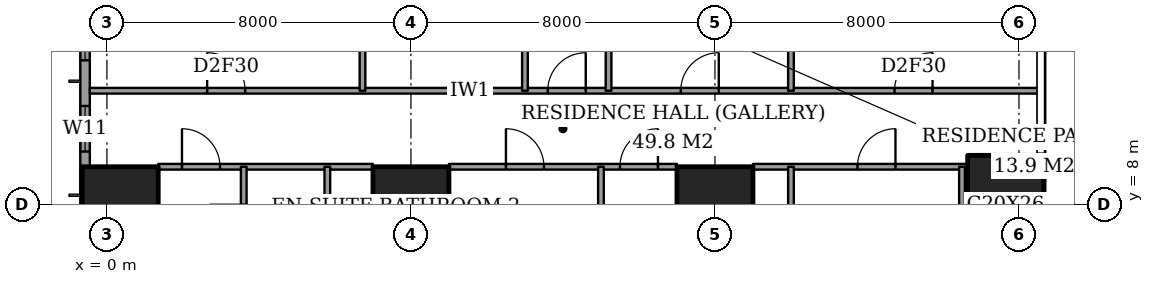
"""IFC4 building model, lengths in metres.
Left out: names, types, materials, properties, quantities, classifications, styles, units other than length and angle.
Written with IfcOpenShell. Run it as: python <this file> out.ifc"""

import sys

from ifc_helpers import new_model, si_unit, direction, frame, frame_2d, origin, origin_2d, place, context, subcontext, project, spatial, rectangle, extrude, element, fill, save


model = new_model("IFC4")
c1 = context("Model", 3, precision=1e-05, world=origin(), true_north=direction((0.0, 1.0)))
c2 = subcontext(c1, "Body", "Model", "MODEL_VIEW")
j1 = project(units=[si_unit("LENGTHUNIT", "METRE"), si_unit("PLANEANGLEUNIT", "RADIAN")], contexts=[c1])
p1 = place(None, origin())
s1 = spatial("IfcSite", under=j1, at=p1, CompositionType="ELEMENT")
p2 = place(p1, origin())
s2 = spatial("IfcBuilding", under=s1, at=p2, CompositionType="ELEMENT")
p3 = place(p2, frame((0.0, 0.0, 143.0)))
s3 = spatial("IfcBuildingStorey", under=s2, at=p3, CompositionType="ELEMENT", Elevation=143.0)
for number, where, z_axis, x_axis in (
    (1, (0.35, 8.0, 0.0), (0.0, 0.0, 1.0), (1.0, 0.0, 0.0)),
    (2, (8.0, 8.0, 0.0), (0.0, 0.0, 1.0), (1.0, 0.0, 0.0)),
    (3, (16.0, 8.0, 0.0), (0.0, 0.0, 1.0), (1.0, 0.0, 0.0)),
):
    element("IfcColumn", number, at=place(p3, frame(where, z_axis=z_axis, x_axis=x_axis)), inside=s3, PredefinedType="COLUMN", context=c2, shape_type="SweptSolid", body=[
        extrude(rectangle(XDim=2.0, YDim=2.0, at=origin_2d()), origin(), (0.0, 0.0, 1.0), 3.6),
    ])
p4 = place(p3, frame((23.65, 8.0, 0.0), z_axis=(0.0, 0.0, 1.0), x_axis=(1.0, 0.0, 0.0)))
e4 = element("IfcColumn", 4, at=p4, inside=s3, PredefinedType="COLUMN", context=c2, shape_type="SweptSolid", body=[
    extrude(rectangle(XDim=2.0, YDim=2.6, at=origin_2d()), origin(), (0.0, 0.0, 1.0), 3.6),
])
p5 = place(p3, frame((-0.575, 44.825, 0.0), z_axis=(0.0, 0.0, 1.0), x_axis=(0.0, -1.0, 0.0)))
e5 = element("IfcWall", 5, at=p5, inside=s3, PredefinedType="SOLIDWALL", context=c2, shape_type="SweptSolid", body=[
    extrude(rectangle(XDim=41.65, YDim=0.25, at=frame_2d((20.825, 0.0))), origin(), (0.0, 0.0, 1.0), 3.6),
])
p6 = place(p5, frame((0.775, 0.0, 0.4)))
e6 = element("IfcOpeningElement", 6, at=p6, cuts=e5, PredefinedType="OPENING", context=c2, shape_type="SweptSolid", body=[
    extrude(rectangle(XDim=2.4, YDim=2.2, at=frame_2d((1.2, 1.1))), frame((0.0, 0.135, 0.0), z_axis=(0.0, -1.0, 0.0), x_axis=(1.0, 0.0, 0.0)), (0.0, 0.0, 1.0), 0.27),
])
p7 = place(p5, frame((6.1, 0.0, 0.4)))
e7 = element("IfcOpeningElement", 7, at=p7, cuts=e5, PredefinedType="OPENING", context=c2, shape_type="SweptSolid", body=[
    extrude(rectangle(XDim=1.2, YDim=2.2, at=frame_2d((0.6, 1.1))), frame((0.0, 0.135, 0.0), z_axis=(0.0, -1.0, 0.0), x_axis=(1.0, 0.0, 0.0)), (0.0, 0.0, 1.0), 0.27),
])
p8 = place(p5, frame((8.425, 0.0, 0.4)))
e8 = element("IfcOpeningElement", 8, at=p8, cuts=e5, PredefinedType="OPENING", context=c2, shape_type="SweptSolid", body=[
    extrude(rectangle(XDim=2.4, YDim=2.2, at=frame_2d((1.2, 1.1))), frame((0.0, 0.135, 0.0), z_axis=(0.0, -1.0, 0.0), x_axis=(1.0, 0.0, 0.0)), (0.0, 0.0, 1.0), 0.27),
])
p9 = place(p5, frame((15.625, 0.0, 0.4)))
e9 = element("IfcOpeningElement", 9, at=p9, cuts=e5, PredefinedType="OPENING", context=c2, shape_type="SweptSolid", body=[
    extrude(rectangle(XDim=2.4, YDim=2.2, at=frame_2d((1.2, 1.1))), frame((0.0, 0.135, 0.0), z_axis=(0.0, -1.0, 0.0), x_axis=(1.0, 0.0, 0.0)), (0.0, 0.0, 1.0), 0.27),
])
p10 = place(p5, frame((23.625, 0.0, 0.4)))
e10 = element("IfcOpeningElement", 10, at=p10, cuts=e5, PredefinedType="OPENING", context=c2, shape_type="SweptSolid", body=[
    extrude(rectangle(XDim=2.4, YDim=2.2, at=frame_2d((1.2, 1.1))), frame((0.0, 0.135, 0.0), z_axis=(0.0, -1.0, 0.0), x_axis=(1.0, 0.0, 0.0)), (0.0, 0.0, 1.0), 0.27),
])
p11 = place(p5, frame((30.625, 0.0, 0.4)))
e11 = element("IfcOpeningElement", 11, at=p11, cuts=e5, PredefinedType="OPENING", context=c2, shape_type="SweptSolid", body=[
    extrude(rectangle(XDim=2.4, YDim=2.2, at=frame_2d((1.2, 1.1))), frame((0.0, 0.135, 0.0), z_axis=(0.0, -1.0, 0.0), x_axis=(1.0, 0.0, 0.0)), (0.0, 0.0, 1.0), 0.27),
])
p12 = place(p5, frame((34.225, 0.0, 0.4)))
e12 = element("IfcOpeningElement", 12, at=p12, cuts=e5, PredefinedType="OPENING", context=c2, shape_type="SweptSolid", body=[
    extrude(rectangle(XDim=1.2, YDim=2.2, at=frame_2d((0.6, 1.1))), frame((0.0, 0.135, 0.0), z_axis=(0.0, -1.0, 0.0), x_axis=(1.0, 0.0, 0.0)), (0.0, 0.0, 1.0), 0.27),
])
p13 = place(p5, frame((38.475, 0.0, 0.4)))
e13 = element("IfcOpeningElement", 13, at=p13, cuts=e5, PredefinedType="OPENING", context=c2, shape_type="SweptSolid", body=[
    extrude(rectangle(XDim=2.4, YDim=2.2, at=frame_2d((1.2, 1.1))), frame((0.0, 0.135, 0.0), z_axis=(0.0, -1.0, 0.0), x_axis=(1.0, 0.0, 0.0)), (0.0, 0.0, 1.0), 0.27),
])
p14 = place(p3, frame((1.35, 9.0, 0.0), z_axis=(0.0, 0.0, 1.0), x_axis=(1.0, 0.0, 0.0)))
e14 = element("IfcWall", 14, at=p14, inside=s3, PredefinedType="PARTITIONING", context=c2, shape_type="SweptSolid", body=[
    extrude(rectangle(XDim=5.65, YDim=0.15, at=frame_2d((2.825, 0.0))), origin(), (0.0, 0.0, 1.0), 3.35),
])
p15 = place(p14, frame((0.625, 0.0, 0.0)))
e15 = element("IfcOpeningElement", 15, at=p15, cuts=e14, PredefinedType="OPENING", context=c2, shape_type="SweptSolid", body=[
    extrude(rectangle(XDim=1.0, YDim=2.1, at=frame_2d((0.5, 1.05))), frame((0.0, 0.085, 0.0), z_axis=(0.0, -1.0, 0.0), x_axis=(1.0, 0.0, 0.0)), (0.0, 0.0, 1.0), 0.17),
])
p16 = place(p3, frame((9.0, 9.0, 0.0), z_axis=(0.0, 0.0, 1.0), x_axis=(1.0, 0.0, 0.0)))
e16 = element("IfcWall", 16, at=p16, inside=s3, PredefinedType="PARTITIONING", context=c2, shape_type="SweptSolid", body=[
    extrude(rectangle(XDim=6.0, YDim=0.15, at=frame_2d((3.0, 0.0))), origin(), (0.0, 0.0, 1.0), 3.35),
])
p17 = place(p16, frame((1.5, 0.0, 0.0)))
e17 = element("IfcOpeningElement", 17, at=p17, cuts=e16, PredefinedType="OPENING", context=c2, shape_type="SweptSolid", body=[
    extrude(rectangle(XDim=1.0, YDim=2.1, at=frame_2d((0.5, 1.05))), frame((0.0, 0.085, 0.0), z_axis=(0.0, -1.0, 0.0), x_axis=(1.0, 0.0, 0.0)), (0.0, 0.0, 1.0), 0.17),
])
p18 = place(p16, frame((4.5, 0.0, 0.0)))
e18 = element("IfcOpeningElement", 18, at=p18, cuts=e16, PredefinedType="OPENING", context=c2, shape_type="SweptSolid", body=[
    extrude(rectangle(XDim=1.0, YDim=2.1, at=frame_2d((0.5, 1.05))), frame((0.0, 0.085, 0.0), z_axis=(0.0, -1.0, 0.0), x_axis=(1.0, 0.0, 0.0)), (0.0, 0.0, 1.0), 0.17),
])
p19 = place(p3, frame((17.0, 9.0, 0.0), z_axis=(0.0, 0.0, 1.0), x_axis=(1.0, 0.0, 0.0)))
e19 = element("IfcWall", 19, at=p19, inside=s3, PredefinedType="PARTITIONING", context=c2, shape_type="SweptSolid", body=[
    extrude(rectangle(XDim=5.65, YDim=0.15, at=frame_2d((2.825, 0.0))), origin(), (0.0, 0.0, 1.0), 3.35),
])
p20 = place(p19, frame((2.75, 0.0, 0.0)))
e20 = element("IfcOpeningElement", 20, at=p20, cuts=e19, PredefinedType="OPENING", context=c2, shape_type="SweptSolid", body=[
    extrude(rectangle(XDim=1.0, YDim=2.1, at=frame_2d((0.5, 1.05))), frame((0.0, 0.085, 0.0), z_axis=(0.0, -1.0, 0.0), x_axis=(1.0, 0.0, 0.0)), (0.0, 0.0, 1.0), 0.17),
])
p21 = place(p3, frame((-0.45, 11.0, 0.0), z_axis=(0.0, 0.0, 1.0), x_axis=(1.0, 0.0, 0.0)))
e21 = element("IfcWall", 21, at=p21, inside=s3, PredefinedType="PARTITIONING", context=c2, shape_type="SweptSolid", body=[
    extrude(rectangle(XDim=25.011, YDim=0.15, at=frame_2d((12.505, 0.0))), origin(), (0.0, 0.0, 1.0), 3.35),
])
p22 = place(p21, frame((12.05, 0.0, 0.0)))
e22 = element("IfcOpeningElement", 22, at=p22, cuts=e21, PredefinedType="OPENING", context=c2, shape_type="SweptSolid", body=[
    extrude(rectangle(XDim=1.0, YDim=2.1, at=frame_2d((0.5, 1.05))), frame((0.0, 0.085, 0.0), z_axis=(0.0, -1.0, 0.0), x_axis=(1.0, 0.0, 0.0)), (0.0, 0.0, 1.0), 0.17),
])
p23 = place(p21, frame((3.087, 0.0, 0.0)))
e23 = element("IfcOpeningElement", 23, at=p23, cuts=e21, PredefinedType="OPENING", context=c2, shape_type="SweptSolid", body=[
    extrude(rectangle(XDim=1.0, YDim=2.1, at=frame_2d((0.5, 1.05))), frame((0.0, 0.085, 0.0), z_axis=(0.0, -1.0, 0.0), x_axis=(1.0, 0.0, 0.0)), (0.0, 0.0, 1.0), 0.17),
])
p24 = place(p21, frame((15.55, 0.0, 0.0)))
e24 = element("IfcOpeningElement", 24, at=p24, cuts=e21, PredefinedType="OPENING", context=c2, shape_type="SweptSolid", body=[
    extrude(rectangle(XDim=1.0, YDim=2.1, at=frame_2d((0.5, 1.05))), frame((0.0, 0.085, 0.0), z_axis=(0.0, -1.0, 0.0), x_axis=(1.0, 0.0, 0.0)), (0.0, 0.0, 1.0), 0.17),
])
p25 = place(p21, frame((21.175, 0.0, 0.0)))
e25 = element("IfcOpeningElement", 25, at=p25, cuts=e21, PredefinedType="OPENING", context=c2, shape_type="SweptSolid", body=[
    extrude(rectangle(XDim=1.0, YDim=2.1, at=frame_2d((0.5, 1.05))), frame((0.0, 0.085, 0.0), z_axis=(0.0, -1.0, 0.0), x_axis=(1.0, 0.0, 0.0)), (0.0, 0.0, 1.0), 0.17),
])
p26 = place(p3, frame((3.6, 6.1, 0.0), z_axis=(0.0, 0.0, 1.0), x_axis=(0.0, 1.0, 0.0)))
e26 = element("IfcWall", 26, at=p26, inside=s3, PredefinedType="PARTITIONING", context=c2, shape_type="SweptSolid", body=[
    extrude(rectangle(XDim=2.9, YDim=0.15, at=frame_2d((1.45, 0.0))), origin(), (0.0, 0.0, 1.0), 3.35),
])
p27 = place(p26, frame((1.0, 0.0, 0.0)))
e27 = element("IfcOpeningElement", 27, at=p27, cuts=e26, PredefinedType="OPENING", context=c2, shape_type="SweptSolid", body=[
    extrude(rectangle(XDim=0.9, YDim=2.1, at=frame_2d((0.45, 1.05))), frame((0.0, 0.085, 0.0), z_axis=(0.0, -1.0, 0.0), x_axis=(1.0, 0.0, 0.0)), (0.0, 0.0, 1.0), 0.17),
])
p28 = place(p3, frame((5.8, -0.45, 0.0), z_axis=(0.0, 0.0, 1.0), x_axis=(0.0, 1.0, 0.0)))
e28 = element("IfcWall", 28, at=p28, inside=s3, PredefinedType="PARTITIONING", context=c2, shape_type="SweptSolid", body=[
    extrude(rectangle(XDim=9.45, YDim=0.15, at=frame_2d((4.725, 0.0))), origin(), (0.0, 0.0, 1.0), 3.35),
])
p29 = place(p3, frame((6.725, 11.0, 0.0), z_axis=(0.0, 0.0, 1.0), x_axis=(0.0, 1.0, 0.0)))
e29 = element("IfcWall", 29, at=p29, inside=s3, PredefinedType="PARTITIONING", context=c2, shape_type="SweptSolid", body=[
    extrude(rectangle(XDim=3.8, YDim=0.15, at=frame_2d((1.9, 0.0))), origin(), (0.0, 0.0, 1.0), 3.35),
])
p30 = place(p29, frame((1.15, 0.0, 0.0)))
e30 = element("IfcOpeningElement", 30, at=p30, cuts=e29, PredefinedType="OPENING", context=c2, shape_type="SweptSolid", body=[
    extrude(rectangle(XDim=0.9, YDim=2.1, at=frame_2d((0.45, 1.05))), frame((0.0, 0.085, 0.0), z_axis=(0.0, -1.0, 0.0), x_axis=(1.0, 0.0, 0.0)), (0.0, 0.0, 1.0), 0.17),
])
p31 = place(p3, frame((11.0, 11.0, 0.0), z_axis=(0.0, 0.0, 1.0), x_axis=(0.0, 1.0, 0.0)))
e31 = element("IfcWall", 31, at=p31, inside=s3, PredefinedType="PARTITIONING", context=c2, shape_type="SweptSolid", body=[
    extrude(rectangle(XDim=10.6, YDim=0.15, at=frame_2d((5.3, 0.0))), origin(), (0.0, 0.0, 1.0), 3.35),
])
p32 = place(p31, frame((7.962, 0.0, 0.0)))
e32 = element("IfcOpeningElement", 32, at=p32, cuts=e31, PredefinedType="OPENING", context=c2, shape_type="SweptSolid", body=[
    extrude(rectangle(XDim=1.0, YDim=2.1, at=frame_2d((0.5, 1.05))), frame((0.0, 0.085, 0.0), z_axis=(0.0, -1.0, 0.0), x_axis=(1.0, 0.0, 0.0)), (0.0, 0.0, 1.0), 0.17),
])
p33 = place(p3, frame((13.0, -0.45, 0.0), z_axis=(0.0, 0.0, 1.0), x_axis=(0.0, 1.0, 0.0)))
e33 = element("IfcWall", 33, at=p33, inside=s3, PredefinedType="PARTITIONING", context=c2, shape_type="SweptSolid", body=[
    extrude(rectangle(XDim=9.45, YDim=0.15, at=frame_2d((4.725, 0.0))), origin(), (0.0, 0.0, 1.0), 3.35),
])
p34 = place(p3, frame((13.2, 11.0, 0.0), z_axis=(0.0, 0.0, 1.0), x_axis=(0.0, 1.0, 0.0)))
e34 = element("IfcWall", 34, at=p34, inside=s3, PredefinedType="PARTITIONING", context=c2, shape_type="SweptSolid", body=[
    extrude(rectangle(XDim=6.325, YDim=0.15, at=frame_2d((3.163, 0.0))), origin(), (0.0, 0.0, 1.0), 3.35),
])
p35 = place(p3, frame((18.0, -0.45, 0.0), z_axis=(0.0, 0.0, 1.0), x_axis=(0.0, 1.0, 0.0)))
e35 = element("IfcWall", 35, at=p35, inside=s3, PredefinedType="PARTITIONING", context=c2, shape_type="SweptSolid", body=[
    extrude(rectangle(XDim=9.45, YDim=0.15, at=frame_2d((4.725, 0.0))), origin(), (0.0, 0.0, 1.0), 3.35),
])
p36 = place(p3, frame((18.0, 11.0, 0.0), z_axis=(0.0, 0.0, 1.0), x_axis=(0.0, 1.0, 0.0)))
e36 = element("IfcWall", 36, at=p36, inside=s3, PredefinedType="PARTITIONING", context=c2, shape_type="SweptSolid", body=[
    extrude(rectangle(XDim=6.325, YDim=0.15, at=frame_2d((3.163, 0.0))), origin(), (0.0, 0.0, 1.0), 3.35),
])
p37 = place(p3, frame((22.5, -0.45, 0.0), z_axis=(0.0, 0.0, 1.0), x_axis=(0.0, 1.0, 0.0)))
e37 = element("IfcWall", 37, at=p37, inside=s3, PredefinedType="PARTITIONING", context=c2, shape_type="SweptSolid", body=[
    extrude(rectangle(XDim=9.45, YDim=0.15, at=frame_2d((4.725, 0.0))), origin(), (0.0, 0.0, 1.0), 3.35),
])
p38 = place(p37, frame((4.275, 0.0, 0.0)))
e38 = element("IfcOpeningElement", 38, at=p38, cuts=e37, PredefinedType="OPENING", context=c2, shape_type="SweptSolid", body=[
    extrude(rectangle(XDim=0.9, YDim=2.1, at=frame_2d((0.45, 1.05))), frame((0.0, 0.085, 0.0), z_axis=(0.0, -1.0, 0.0), x_axis=(1.0, 0.0, 0.0)), (0.0, 0.0, 1.0), 0.17),
])
p39 = place(p11, origin())
e39 = element("IfcWindow", 39, at=p39, inside=s3, PartitioningType="SINGLE_PANEL", PredefinedType="WINDOW", context=c2, shape_type="SweptSolid", body=[
    extrude(rectangle(XDim=2.4, YDim=2.2, at=frame_2d((1.2, 1.1))), frame((0.0, 0.03, 0.0), z_axis=(0.0, -1.0, 0.0), x_axis=(1.0, 0.0, 0.0)), (0.0, 0.0, 1.0), 0.06),
])
fill(e11, e39)
p40 = place(p12, origin())
e40 = element("IfcWindow", 40, at=p40, inside=s3, PartitioningType="SINGLE_PANEL", PredefinedType="WINDOW", context=c2, shape_type="SweptSolid", body=[
    extrude(rectangle(XDim=1.2, YDim=2.2, at=frame_2d((0.6, 1.1))), frame((0.0, 0.03, 0.0), z_axis=(0.0, -1.0, 0.0), x_axis=(1.0, 0.0, 0.0)), (0.0, 0.0, 1.0), 0.06),
])
fill(e12, e40)
p41 = place(p15, origin())
e41 = element("IfcDoor", 41, at=p41, inside=s3, OperationType="SINGLE_SWING_RIGHT", PredefinedType="DOOR", context=c2, shape_type="SweptSolid", body=[
    extrude(rectangle(XDim=1.0, YDim=2.1, at=frame_2d((0.5, 1.05))), frame((0.0, 0.025, 0.0), z_axis=(0.0, -1.0, 0.0), x_axis=(1.0, 0.0, 0.0)), (0.0, 0.0, 1.0), 0.05),
])
fill(e15, e41)
p42 = place(p17, origin())
e42 = element("IfcDoor", 42, at=p42, inside=s3, OperationType="SINGLE_SWING_RIGHT", PredefinedType="DOOR", context=c2, shape_type="SweptSolid", body=[
    extrude(rectangle(XDim=1.0, YDim=2.1, at=frame_2d((0.5, 1.05))), frame((0.0, 0.025, 0.0), z_axis=(0.0, -1.0, 0.0), x_axis=(1.0, 0.0, 0.0)), (0.0, 0.0, 1.0), 0.05),
])
fill(e17, e42)
p43 = place(p18, origin())
e43 = element("IfcDoor", 43, at=p43, inside=s3, OperationType="SINGLE_SWING_LEFT", PredefinedType="DOOR", context=c2, shape_type="SweptSolid", body=[
    extrude(rectangle(XDim=1.0, YDim=2.1, at=frame_2d((0.5, 1.05))), frame((0.0, 0.025, 0.0), z_axis=(0.0, -1.0, 0.0), x_axis=(1.0, 0.0, 0.0)), (0.0, 0.0, 1.0), 0.05),
])
fill(e18, e43)
p44 = place(p20, origin())
e44 = element("IfcDoor", 44, at=p44, inside=s3, OperationType="SINGLE_SWING_LEFT", PredefinedType="DOOR", context=c2, shape_type="SweptSolid", body=[
    extrude(rectangle(XDim=1.0, YDim=2.1, at=frame_2d((0.5, 1.05))), frame((0.0, 0.025, 0.0), z_axis=(0.0, -1.0, 0.0), x_axis=(1.0, 0.0, 0.0)), (0.0, 0.0, 1.0), 0.05),
])
fill(e20, e44)
p45 = place(p22, origin())
e45 = element("IfcDoor", 45, at=p45, inside=s3, OperationType="SINGLE_SWING_LEFT", PredefinedType="DOOR", context=c2, shape_type="SweptSolid", body=[
    extrude(rectangle(XDim=1.0, YDim=2.1, at=frame_2d((0.5, 1.05))), frame((0.0, 0.025, 0.0), z_axis=(0.0, -1.0, 0.0), x_axis=(1.0, 0.0, 0.0)), (0.0, 0.0, 1.0), 0.05),
])
fill(e22, e45)
p46 = place(p23, origin())
e46 = element("IfcDoor", 46, at=p46, inside=s3, OperationType="SINGLE_SWING_RIGHT", PredefinedType="DOOR", context=c2, shape_type="SweptSolid", body=[
    extrude(rectangle(XDim=1.0, YDim=2.1, at=frame_2d((0.5, 1.05))), frame((0.0, 0.025, 0.0), z_axis=(0.0, -1.0, 0.0), x_axis=(1.0, 0.0, 0.0)), (0.0, 0.0, 1.0), 0.05),
])
fill(e23, e46)
p47 = place(p24, origin())
e47 = element("IfcDoor", 47, at=p47, inside=s3, OperationType="SINGLE_SWING_LEFT", PredefinedType="DOOR", context=c2, shape_type="SweptSolid", body=[
    extrude(rectangle(XDim=1.0, YDim=2.1, at=frame_2d((0.5, 1.05))), frame((0.0, 0.025, 0.0), z_axis=(0.0, -1.0, 0.0), x_axis=(1.0, 0.0, 0.0)), (0.0, 0.0, 1.0), 0.05),
])
fill(e24, e47)
p48 = place(p25, origin())
e48 = element("IfcDoor", 48, at=p48, inside=s3, OperationType="SINGLE_SWING_LEFT", PredefinedType="DOOR", context=c2, shape_type="SweptSolid", body=[
    extrude(rectangle(XDim=1.0, YDim=2.1, at=frame_2d((0.5, 1.05))), frame((0.0, 0.025, 0.0), z_axis=(0.0, -1.0, 0.0), x_axis=(1.0, 0.0, 0.0)), (0.0, 0.0, 1.0), 0.05),
])
fill(e25, e48)
save(model, sys.argv[1])
